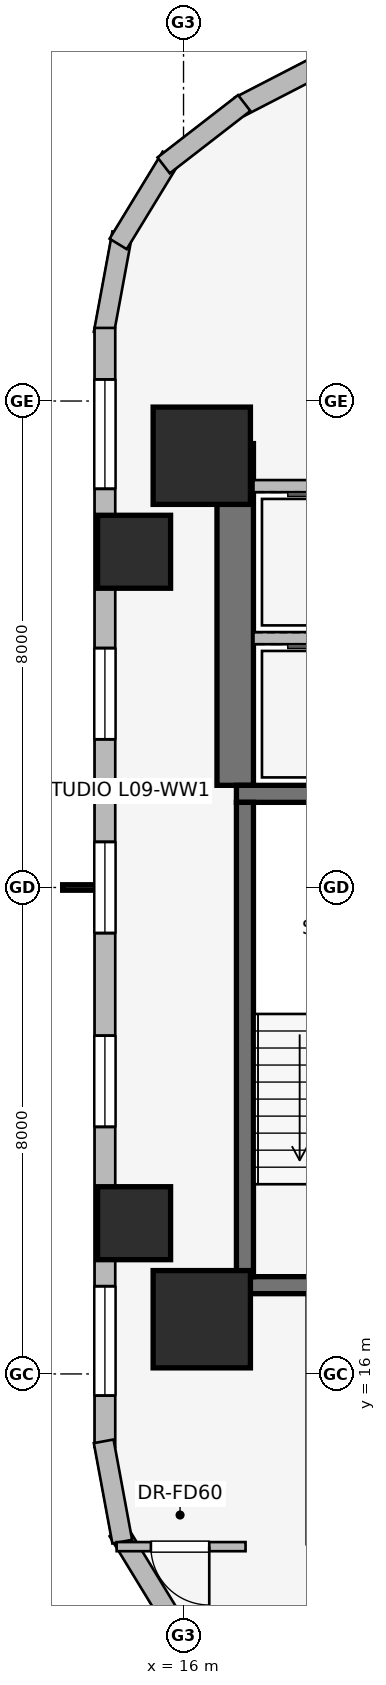
"""IFC4 building model, lengths in metres.
Left out: names, types, materials, properties, quantities, classifications, styles, units other than length and angle.
Written with IfcOpenShell. Run it as: python <this file> out.ifc"""

import sys

from ifc_helpers import new_model, si_unit, direction, frame, frame_2d, origin, origin_2d, place, context, subcontext, project, spatial, rectangle, extrude, element, fill, save


model = new_model("IFC4")
c1 = context("Model", 3, precision=1e-05, world=origin(), true_north=direction((0.0, 1.0)))
c2 = subcontext(c1, "Body", "Model", "MODEL_VIEW")
j1 = project(units=[si_unit("LENGTHUNIT", "METRE"), si_unit("PLANEANGLEUNIT", "RADIAN")], contexts=[c1])
p1 = place(None, origin())
s1 = spatial("IfcSite", under=j1, at=p1, CompositionType="ELEMENT")
p2 = place(p1, origin())
s2 = spatial("IfcBuilding", under=s1, at=p2, CompositionType="ELEMENT")
p3 = place(p2, frame((0.0, 0.0, 37.95)))
s3 = spatial("IfcBuildingStorey", under=s2, at=p3, CompositionType="ELEMENT", Elevation=37.95)
p4 = place(p3, frame((16.85, 25.68, 0.0), z_axis=(0.0, 0.0, 1.0), x_axis=(0.0, 1.0, 0.0)))
e1 = element("IfcWall", 1, at=p4, inside=s3, PredefinedType="SHEAR", context=c2, shape_type="SweptSolid", body=[
    extrude(rectangle(XDim=5.62, YDim=0.6, at=frame_2d((2.81, 0.0))), origin(), (0.0, 0.0, 1.0), 3.65),
])
for number, where, z_axis, x_axis in (
    (2, (16.87, 17.46, 0.0), (0.0, 0.0, 1.0), (1.0, 0.0, 0.0)),
    (3, (20.63, 25.54, 0.0), (0.0, 0.0, 1.0), (-1.0, 0.0, 0.0)),
):
    element("IfcWall", number, at=place(p3, frame(where, z_axis=z_axis, x_axis=x_axis)), inside=s3, PredefinedType="SHEAR", context=c2, shape_type="SweptSolid", body=[
        extrude(rectangle(XDim=3.76, YDim=0.28, at=frame_2d((1.88, 0.0))), origin(), (0.0, 0.0, 1.0), 3.65),
    ])
p5 = place(p3, frame((17.01, 25.4, 0.0), z_axis=(0.0, 0.0, 1.0), x_axis=(0.0, -1.0, 0.0)))
e4 = element("IfcWall", 4, at=p5, inside=s3, PredefinedType="SHEAR", context=c2, shape_type="SweptSolid", body=[
    extrude(rectangle(XDim=7.8, YDim=0.28, at=frame_2d((3.9, 0.0))), origin(), (0.0, 0.0, 1.0), 3.65),
])
for number, where, z_axis, x_axis in (
    (5, (16.3, 16.9, 0.0), (0.0, 0.0, 1.0), (1.0, 0.0, 0.0)),
    (6, (16.3, 31.1, 0.0), (0.0, 0.0, 1.0), (1.0, 0.0, 0.0)),
):
    element("IfcColumn", number, at=place(p3, frame(where, z_axis=z_axis, x_axis=x_axis)), inside=s3, PredefinedType="COLUMN", context=c2, shape_type="SweptSolid", body=[
        extrude(rectangle(XDim=1.6, YDim=1.6, at=origin_2d()), origin(), (0.0, 0.0, 1.0), 3.65),
    ])
for number, where, z_axis, x_axis in (
    (7, (15.187, 29.521, 0.0), (0.0, 0.0, 1.0), (1.0, 0.0, 0.0)),
    (8, (15.187, 18.479, 0.0), (0.0, 0.0, 1.0), (1.0, 0.0, 0.0)),
):
    element("IfcColumn", number, at=place(p3, frame(where, z_axis=z_axis, x_axis=x_axis)), inside=s3, PredefinedType="COLUMN", context=c2, shape_type="SweptSolid", body=[
        extrude(rectangle(XDim=1.2, YDim=1.2, at=origin_2d()), origin(), (0.0, 0.0, 1.0), 3.65),
    ])
p6 = place(p3, frame((16.924, 36.841, 0.0), z_axis=(0.0, 0.0, 1.0), x_axis=(0.888634413993, 0.458616264721, 0.0)))
e9 = element("IfcWall", 9, at=p6, inside=s3, PredefinedType="STANDARD", context=c2, shape_type="SweptSolid", body=[
    extrude(rectangle(XDim=20.531, YDim=0.34, at=frame_2d((10.266, 0.0))), origin(), (0.0, 0.0, 1.0), 2.684),
])
p7 = place(p6, frame((2.161, 0.0, 0.75)))
e10 = element("IfcOpeningElement", 10, at=p7, cuts=e9, PredefinedType="OPENING", context=c2, shape_type="SweptSolid", body=[
    extrude(rectangle(XDim=1.05, YDim=1.4, at=frame_2d((0.525, 0.7))), frame((0.0, 0.18, 0.0), z_axis=(0.0, -1.0, 0.0), x_axis=(1.0, 0.0, 0.0)), (0.0, 0.0, 1.0), 0.36),
])
p8 = place(p6, frame((5.903, 0.0, 0.75)))
e11 = element("IfcOpeningElement", 11, at=p8, cuts=e9, PredefinedType="OPENING", context=c2, shape_type="SweptSolid", body=[
    extrude(rectangle(XDim=1.5, YDim=1.5, at=frame_2d((0.75, 0.75))), frame((0.0, 0.18, 0.0), z_axis=(0.0, -1.0, 0.0), x_axis=(1.0, 0.0, 0.0)), (0.0, 0.0, 1.0), 0.36),
])
p9 = place(p6, frame((9.516, 0.0, 0.75)))
e12 = element("IfcOpeningElement", 12, at=p9, cuts=e9, PredefinedType="OPENING", context=c2, shape_type="SweptSolid", body=[
    extrude(rectangle(XDim=1.5, YDim=1.5, at=frame_2d((0.75, 0.75))), frame((0.0, 0.18, 0.0), z_axis=(0.0, -1.0, 0.0), x_axis=(1.0, 0.0, 0.0)), (0.0, 0.0, 1.0), 0.36),
])
p10 = place(p6, frame((13.129, 0.0, 0.75)))
e13 = element("IfcOpeningElement", 13, at=p10, cuts=e9, PredefinedType="OPENING", context=c2, shape_type="SweptSolid", body=[
    extrude(rectangle(XDim=1.5, YDim=1.5, at=frame_2d((0.75, 0.75))), frame((0.0, 0.18, 0.0), z_axis=(0.0, -1.0, 0.0), x_axis=(1.0, 0.0, 0.0)), (0.0, 0.0, 1.0), 0.36),
])
p11 = place(p6, frame((17.476, 0.0, 0.75)))
e14 = element("IfcOpeningElement", 14, at=p11, cuts=e9, PredefinedType="OPENING", context=c2, shape_type="SweptSolid", body=[
    extrude(rectangle(XDim=1.05, YDim=1.4, at=frame_2d((0.525, 0.7))), frame((0.0, 0.18, 0.0), z_axis=(0.0, -1.0, 0.0), x_axis=(1.0, 0.0, 0.0)), (0.0, 0.0, 1.0), 0.36),
])
p12 = place(p3, frame((14.687, 33.108, 0.0), z_axis=(0.0, 0.0, 1.0), x_axis=(0.181714143354, 0.983351397063, 0.0)))
e15 = element("IfcWall", 15, at=p12, inside=s3, PredefinedType="STANDARD", context=c2, shape_type="SweptSolid", body=[
    extrude(rectangle(XDim=1.678, YDim=0.33, at=frame_2d((0.839, 0.0))), origin(), (0.0, 0.0, 1.0), 3.39),
])
p13 = place(p3, frame((14.925, 34.583, 0.0), z_axis=(0.0, 0.0, 1.0), x_axis=(0.520584129191, 0.853810379671, 0.0)))
e16 = element("IfcWall", 16, at=p13, inside=s3, PredefinedType="STANDARD", context=c2, shape_type="SweptSolid", body=[
    extrude(rectangle(XDim=1.677, YDim=0.33, at=frame_2d((0.838, 0.0))), origin(), (0.0, 0.0, 1.0), 3.39),
])
p14 = place(p3, frame((15.673, 35.875, 0.0), z_axis=(0.0, 0.0, 1.0), x_axis=(0.790691856293, 0.61221433207, 0.0)))
e17 = element("IfcWall", 17, at=p14, inside=s3, PredefinedType="STANDARD", context=c2, shape_type="SweptSolid", body=[
    extrude(rectangle(XDim=1.676, YDim=0.33, at=frame_2d((0.838, 0.0))), origin(), (0.0, 0.0, 1.0), 3.39),
])
p15 = place(p3, frame((14.707, 14.798, 0.0), z_axis=(0.0, 0.0, 1.0), x_axis=(0.0, 1.0, 0.0)))
e18 = element("IfcWall", 18, at=p15, inside=s3, PredefinedType="STANDARD", context=c2, shape_type="SweptSolid", body=[
    extrude(rectangle(XDim=18.404, YDim=0.34, at=frame_2d((9.202, 0.0))), origin(), (0.0, 0.0, 1.0), 2.684),
])
p16 = place(p15, frame((0.845, 0.0, 0.75)))
e19 = element("IfcOpeningElement", 19, at=p16, cuts=e18, PredefinedType="OPENING", context=c2, shape_type="SweptSolid", body=[
    extrude(rectangle(XDim=1.8, YDim=1.5, at=frame_2d((0.9, 0.75))), frame((0.0, 0.18, 0.0), z_axis=(0.0, -1.0, 0.0), x_axis=(1.0, 0.0, 0.0)), (0.0, 0.0, 1.0), 0.36),
])
p17 = place(p15, frame((5.265, 0.0, 0.75)))
e20 = element("IfcOpeningElement", 20, at=p17, cuts=e18, PredefinedType="OPENING", context=c2, shape_type="SweptSolid", body=[
    extrude(rectangle(XDim=1.5, YDim=1.5, at=frame_2d((0.75, 0.75))), frame((0.0, 0.18, 0.0), z_axis=(0.0, -1.0, 0.0), x_axis=(1.0, 0.0, 0.0)), (0.0, 0.0, 1.0), 0.36),
])
p18 = place(p15, frame((8.452, 0.0, 0.75)))
e21 = element("IfcOpeningElement", 21, at=p18, cuts=e18, PredefinedType="OPENING", context=c2, shape_type="SweptSolid", body=[
    extrude(rectangle(XDim=1.5, YDim=1.5, at=frame_2d((0.75, 0.75))), frame((0.0, 0.18, 0.0), z_axis=(0.0, -1.0, 0.0), x_axis=(1.0, 0.0, 0.0)), (0.0, 0.0, 1.0), 0.36),
])
p19 = place(p15, frame((11.639, 0.0, 0.75)))
e22 = element("IfcOpeningElement", 22, at=p19, cuts=e18, PredefinedType="OPENING", context=c2, shape_type="SweptSolid", body=[
    extrude(rectangle(XDim=1.5, YDim=1.5, at=frame_2d((0.75, 0.75))), frame((0.0, 0.18, 0.0), z_axis=(0.0, -1.0, 0.0), x_axis=(1.0, 0.0, 0.0)), (0.0, 0.0, 1.0), 0.36),
])
p20 = place(p15, frame((15.758, 0.0, 0.75)))
e23 = element("IfcOpeningElement", 23, at=p20, cuts=e18, PredefinedType="OPENING", context=c2, shape_type="SweptSolid", body=[
    extrude(rectangle(XDim=1.8, YDim=1.5, at=frame_2d((0.9, 0.75))), frame((0.0, 0.18, 0.0), z_axis=(0.0, -1.0, 0.0), x_axis=(1.0, 0.0, 0.0)), (0.0, 0.0, 1.0), 0.36),
])
p21 = place(p3, frame((16.998, 11.099, 0.0), z_axis=(0.0, 0.0, 1.0), x_axis=(-0.790691856293, 0.61221433207, 0.0)))
e24 = element("IfcWall", 24, at=p21, inside=s3, PredefinedType="STANDARD", context=c2, shape_type="SweptSolid", body=[
    extrude(rectangle(XDim=1.676, YDim=0.33, at=frame_2d((0.838, 0.0))), origin(), (0.0, 0.0, 1.0), 3.39),
])
p22 = place(p3, frame((15.798, 11.985, 0.0), z_axis=(0.0, 0.0, 1.0), x_axis=(-0.520584129191, 0.853810379671, 0.0)))
e25 = element("IfcWall", 25, at=p22, inside=s3, PredefinedType="STANDARD", context=c2, shape_type="SweptSolid", body=[
    extrude(rectangle(XDim=1.677, YDim=0.33, at=frame_2d((0.838, 0.0))), origin(), (0.0, 0.0, 1.0), 3.39),
])
p23 = place(p3, frame((14.992, 13.242, 0.0), z_axis=(0.0, 0.0, 1.0), x_axis=(-0.181714143354, 0.983351397063, 0.0)))
e26 = element("IfcWall", 26, at=p23, inside=s3, PredefinedType="STANDARD", context=c2, shape_type="SweptSolid", body=[
    extrude(rectangle(XDim=1.678, YDim=0.33, at=frame_2d((0.839, 0.0))), origin(), (0.0, 0.0, 1.0), 3.39),
])
p24 = place(p3, frame((17.15, 28.1, 0.0), z_axis=(0.0, 0.0, 1.0), x_axis=(1.0, 0.0, 0.0)))
e27 = element("IfcWall", 27, at=p24, inside=s3, PredefinedType="PARTITIONING", context=c2, shape_type="SweptSolid", body=[
    extrude(rectangle(XDim=2.5, YDim=0.2, at=frame_2d((1.25, 0.0))), origin(), (0.0, 0.0, 1.0), 3.39),
])
p25 = place(p3, frame((19.65, 30.6, 0.0), z_axis=(0.0, 0.0, 1.0), x_axis=(-1.0, 0.0, 0.0)))
e28 = element("IfcWall", 28, at=p25, inside=s3, PredefinedType="PARTITIONING", context=c2, shape_type="SweptSolid", body=[
    extrude(rectangle(XDim=2.5, YDim=0.2, at=frame_2d((1.25, 0.0))), origin(), (0.0, 0.0, 1.0), 2.29),
])
p26 = place(p3, frame((17.02, 13.16, 0.0), z_axis=(0.0, 0.0, 1.0), x_axis=(-1.0, 0.0, 0.0)))
e29 = element("IfcWall", 29, at=p26, inside=s3, PredefinedType="PARTITIONING", context=c2, shape_type="SweptSolid", body=[
    extrude(rectangle(XDim=2.12, YDim=0.15, at=frame_2d((1.06, 0.0))), origin(), (0.0, 0.0, 1.0), 3.39),
])
p27 = place(p26, frame((0.597, 0.0, 0.0)))
e30 = element("IfcOpeningElement", 30, at=p27, cuts=e29, PredefinedType="OPENING", context=c2, shape_type="SweptSolid", body=[
    extrude(rectangle(XDim=0.96, YDim=2.0, at=frame_2d((0.48, 1.0))), frame((0.0, 0.085, 0.0), z_axis=(0.0, -1.0, 0.0), x_axis=(1.0, 0.0, 0.0)), (0.0, 0.0, 1.0), 0.17),
])
p28 = place(p16, origin())
e31 = element("IfcWindow", 31, at=p28, inside=s3, PartitioningType="SINGLE_PANEL", PredefinedType="WINDOW", context=c2, shape_type="SweptSolid", body=[
    extrude(rectangle(XDim=1.8, YDim=1.5, at=frame_2d((0.9, 0.75))), frame((0.0, 0.03, 0.0), z_axis=(0.0, -1.0, 0.0), x_axis=(1.0, 0.0, 0.0)), (0.0, 0.0, 1.0), 0.06),
])
fill(e19, e31)
p29 = place(p17, origin())
e32 = element("IfcWindow", 32, at=p29, inside=s3, PartitioningType="SINGLE_PANEL", PredefinedType="WINDOW", context=c2, shape_type="SweptSolid", body=[
    extrude(rectangle(XDim=1.5, YDim=1.5, at=frame_2d((0.75, 0.75))), frame((0.0, 0.03, 0.0), z_axis=(0.0, -1.0, 0.0), x_axis=(1.0, 0.0, 0.0)), (0.0, 0.0, 1.0), 0.06),
])
fill(e20, e32)
p30 = place(p18, origin())
e33 = element("IfcWindow", 33, at=p30, inside=s3, PartitioningType="SINGLE_PANEL", PredefinedType="WINDOW", context=c2, shape_type="SweptSolid", body=[
    extrude(rectangle(XDim=1.5, YDim=1.5, at=frame_2d((0.75, 0.75))), frame((0.0, 0.03, 0.0), z_axis=(0.0, -1.0, 0.0), x_axis=(1.0, 0.0, 0.0)), (0.0, 0.0, 1.0), 0.06),
])
fill(e21, e33)
p31 = place(p19, origin())
e34 = element("IfcWindow", 34, at=p31, inside=s3, PartitioningType="SINGLE_PANEL", PredefinedType="WINDOW", context=c2, shape_type="SweptSolid", body=[
    extrude(rectangle(XDim=1.5, YDim=1.5, at=frame_2d((0.75, 0.75))), frame((0.0, 0.03, 0.0), z_axis=(0.0, -1.0, 0.0), x_axis=(1.0, 0.0, 0.0)), (0.0, 0.0, 1.0), 0.06),
])
fill(e22, e34)
p32 = place(p20, origin())
e35 = element("IfcWindow", 35, at=p32, inside=s3, PartitioningType="SINGLE_PANEL", PredefinedType="WINDOW", context=c2, shape_type="SweptSolid", body=[
    extrude(rectangle(XDim=1.8, YDim=1.5, at=frame_2d((0.9, 0.75))), frame((0.0, 0.03, 0.0), z_axis=(0.0, -1.0, 0.0), x_axis=(1.0, 0.0, 0.0)), (0.0, 0.0, 1.0), 0.06),
])
fill(e23, e35)
p33 = place(p27, origin())
e36 = element("IfcDoor", 36, at=p33, inside=s3, OperationType="SINGLE_SWING_LEFT", PredefinedType="DOOR", context=c2, shape_type="SweptSolid", body=[
    extrude(rectangle(XDim=0.96, YDim=2.0, at=frame_2d((0.48, 1.0))), frame((0.0, 0.025, 0.0), z_axis=(0.0, -1.0, 0.0), x_axis=(1.0, 0.0, 0.0)), (0.0, 0.0, 1.0), 0.05),
])
fill(e30, e36)
save(model, sys.argv[1])
